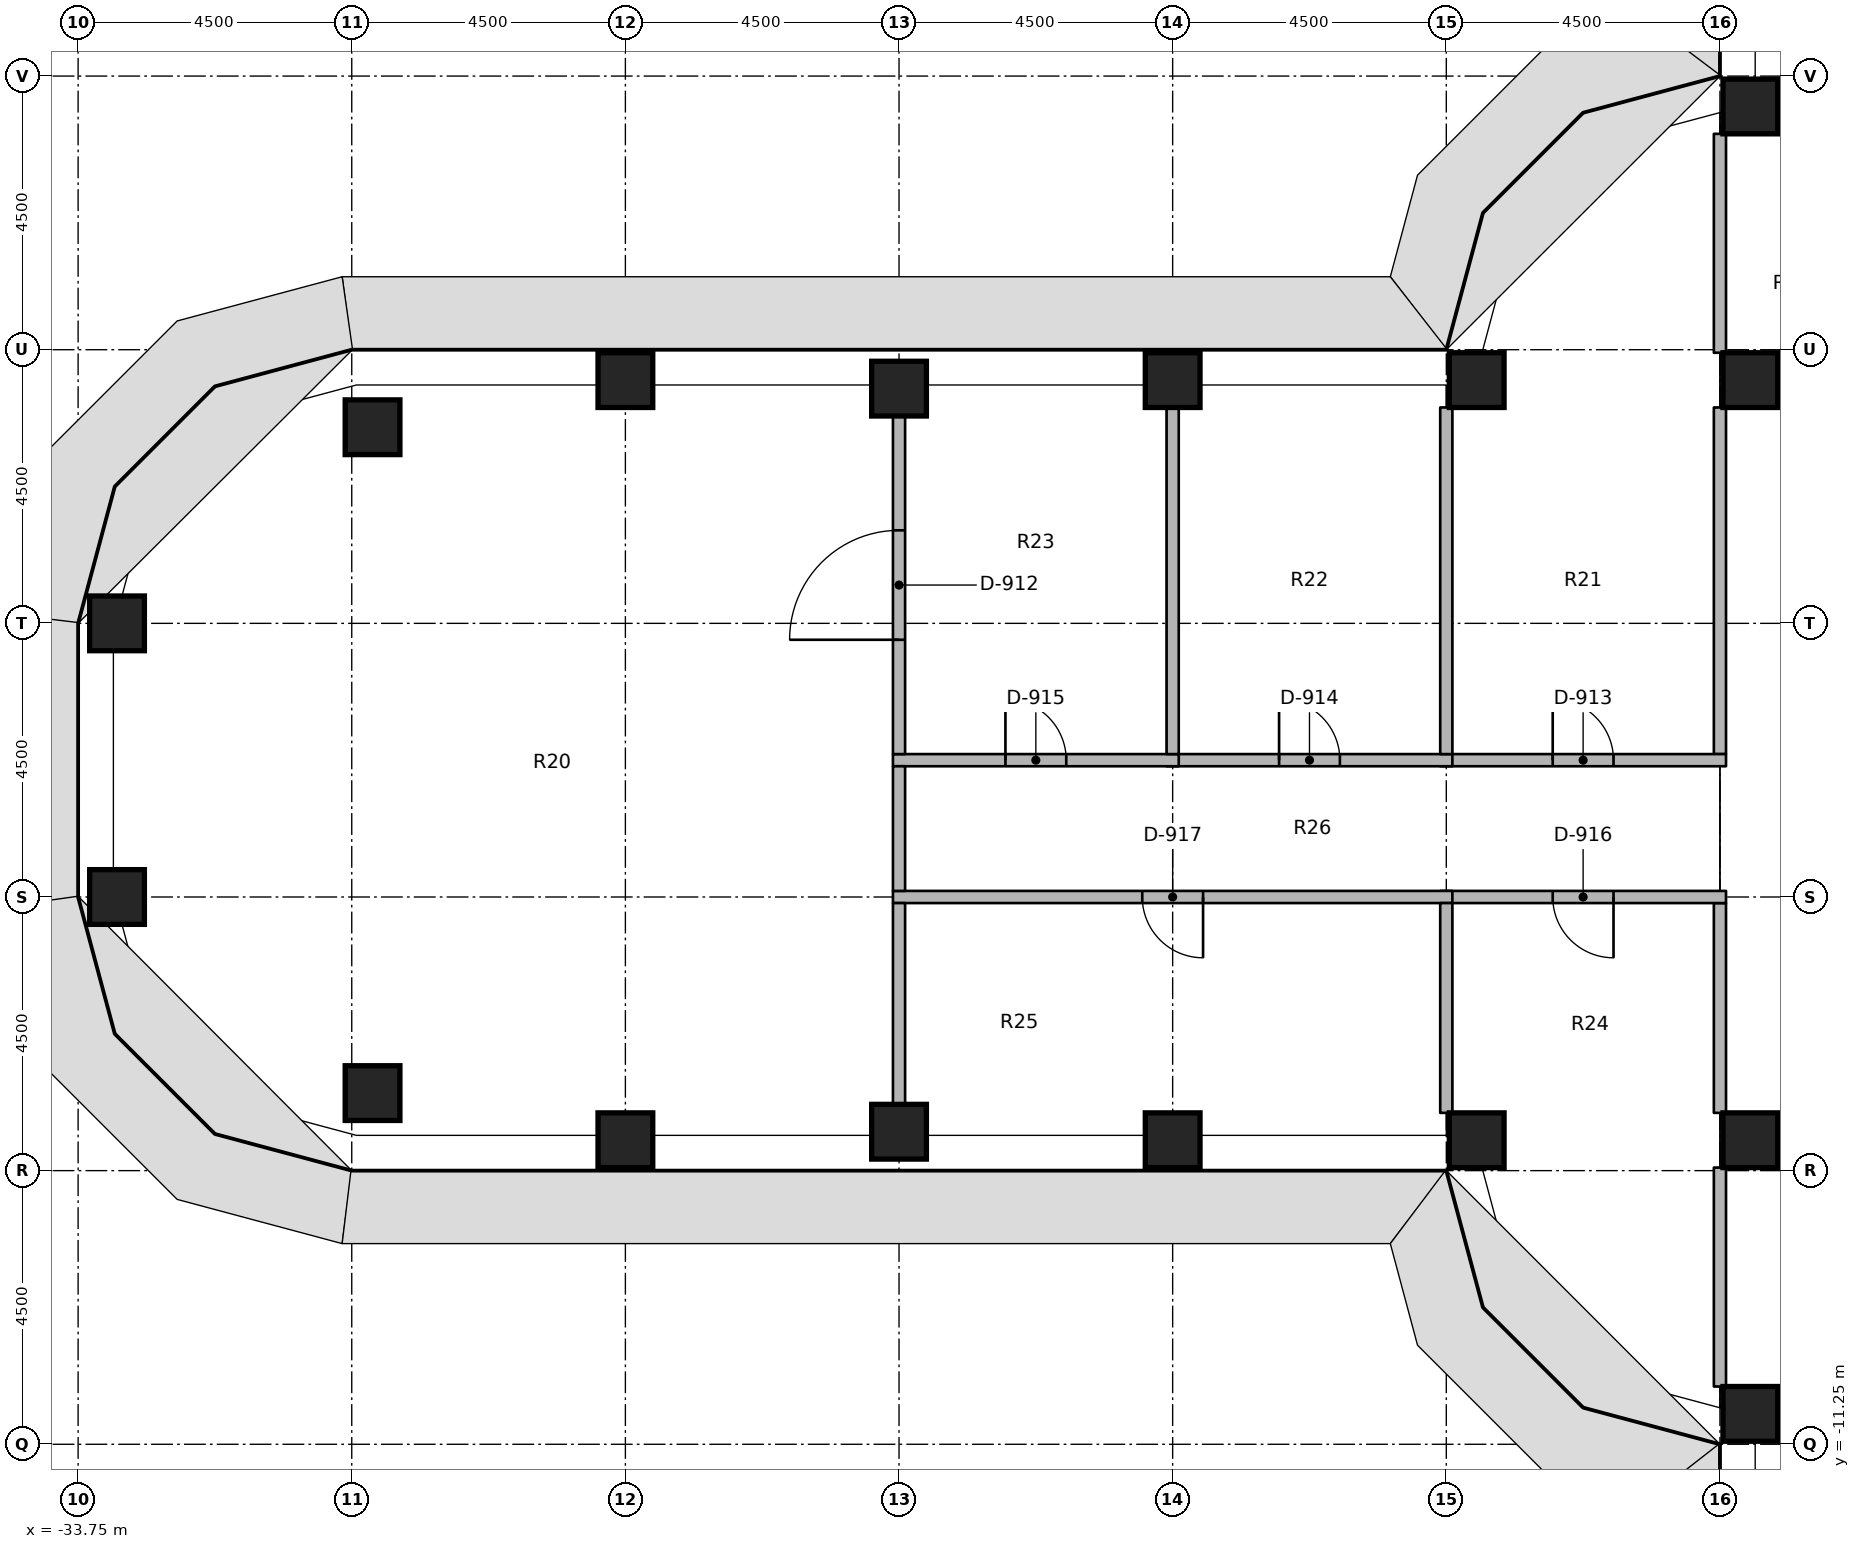
"""IFC4 building model, lengths in metres.
Left out: names, types, materials, properties, quantities, classifications, styles, units other than length and angle.
Written with IfcOpenShell. Run it as: python <this file> out.ifc"""

import sys

from ifc_helpers import new_model, si_unit, direction, frame, frame_2d, origin, origin_2d, place, context, subcontext, project, spatial, rectangle, extrude, element, fill, save


model = new_model("IFC4")
c1 = context("Model", 3, precision=1e-05, world=origin(), true_north=direction((0.0, 1.0)))
c2 = subcontext(c1, "Body", "Model", "MODEL_VIEW")
j1 = project(units=[si_unit("LENGTHUNIT", "METRE"), si_unit("PLANEANGLEUNIT", "RADIAN")], contexts=[c1])
p1 = place(None, origin())
s1 = spatial("IfcSite", under=j1, at=p1, CompositionType="ELEMENT")
p2 = place(p1, origin())
s2 = spatial("IfcBuilding", under=s1, at=p2, CompositionType="ELEMENT")
p3 = place(p2, frame((0.0, 0.0, 109.4)))
s3 = spatial("IfcBuildingStorey", under=s2, at=p3, CompositionType="ELEMENT", Elevation=109.4)
for number, where, z_axis, x_axis in (
    (1, (-33.11, -2.25, 0.0), (0.0, 0.0, 1.0), (1.0, 0.0, 0.0)),
    (2, (-33.11, 2.25, 0.0), (0.0, 0.0, 1.0), (1.0, 0.0, 0.0)),
    (3, (-28.908, -5.475, 0.0), (0.0, 0.0, 1.0), (1.0, 0.0, 0.0)),
    (4, (-28.908, 5.475, 0.0), (0.0, 0.0, 1.0), (1.0, 0.0, 0.0)),
    (5, (-24.75, -6.25, 0.0), (0.0, 0.0, 1.0), (1.0, 0.0, 0.0)),
    (6, (-24.75, 6.25, 0.0), (0.0, 0.0, 1.0), (1.0, 0.0, 0.0)),
    (7, (-20.25, -6.11, 0.0), (0.0, 0.0, 1.0), (1.0, 0.0, 0.0)),
    (8, (-20.25, 6.11, 0.0), (0.0, 0.0, 1.0), (1.0, 0.0, 0.0)),
    (9, (-15.75, -6.25, 0.0), (0.0, 0.0, 1.0), (1.0, 0.0, 0.0)),
    (10, (-15.75, 6.25, 0.0), (0.0, 0.0, 1.0), (1.0, 0.0, 0.0)),
    (11, (-10.75, -6.25, 0.0), (0.0, 0.0, 1.0), (1.0, 0.0, 0.0)),
    (12, (-10.75, 6.25, 0.0), (0.0, 0.0, 1.0), (1.0, 0.0, 0.0)),
    (13, (-6.25, -10.75, 0.0), (0.0, 0.0, 1.0), (1.0, 0.0, 0.0)),
    (14, (-6.25, -6.25, 0.0), (0.0, 0.0, 1.0), (1.0, 0.0, 0.0)),
    (15, (-6.25, 6.25, 0.0), (0.0, 0.0, 1.0), (1.0, 0.0, 0.0)),
    (16, (-6.25, 10.75, 0.0), (0.0, 0.0, 1.0), (1.0, 0.0, 0.0)),
):
    element("IfcColumn", number, at=place(p3, frame(where, z_axis=z_axis, x_axis=x_axis)), inside=s3, PredefinedType="COLUMN", context=c2, shape_type="SweptSolid", body=[
        extrude(rectangle(XDim=0.9, YDim=0.9, at=origin_2d()), origin(), (0.0, 0.0, 1.0), 3.65),
    ])
p4 = place(p3, frame((-6.75, 0.1, 0.0), z_axis=(0.0, 0.0, 1.0), x_axis=(0.0, 1.0, 0.0)))
e17 = element("IfcWall", 17, at=p4, inside=s3, PredefinedType="PARTITIONING", context=c2, shape_type="SweptSolid", body=[
    extrude(rectangle(XDim=5.7, YDim=0.2, at=frame_2d((2.85, 0.0))), origin(), (0.0, 0.0, 1.0), 2.738),
])
for number, where, z_axis, x_axis in (
    (18, (-6.75, 6.7, 0.0), (0.0, 0.0, 1.0), (0.0, 1.0, 0.0)),
    (19, (-6.75, -10.3, 0.0), (0.0, 0.0, 1.0), (0.0, 1.0, 0.0)),
):
    element("IfcWall", number, at=place(p3, frame(where, z_axis=z_axis, x_axis=x_axis)), inside=s3, PredefinedType="PARTITIONING", context=c2, shape_type="SweptSolid", body=[
        extrude(rectangle(XDim=3.6, YDim=0.2, at=frame_2d((1.8, 0.0))), origin(), (0.0, 0.0, 1.0), 2.738),
    ])
p5 = place(p3, frame((-6.75, -5.8, 0.0), z_axis=(0.0, 0.0, 1.0), x_axis=(0.0, 1.0, 0.0)))
e20 = element("IfcWall", 20, at=p5, inside=s3, PredefinedType="PARTITIONING", context=c2, shape_type="SweptSolid", body=[
    extrude(rectangle(XDim=3.45, YDim=0.2, at=frame_2d((1.725, 0.0))), origin(), (0.0, 0.0, 1.0), 2.738),
])
p6 = place(p3, frame((-11.35, 0.0, 0.0), z_axis=(0.0, 0.0, 1.0), x_axis=(1.0, 0.0, 0.0)))
e21 = element("IfcWall", 21, at=p6, inside=s3, PredefinedType="PARTITIONING", context=c2, shape_type="SweptSolid", body=[
    extrude(rectangle(XDim=4.7, YDim=0.2, at=frame_2d((2.35, 0.0))), origin(), (0.0, 0.0, 1.0), 2.738),
])
p7 = place(p6, frame((1.85, 0.0, 0.0)))
e22 = element("IfcOpeningElement", 22, at=p7, cuts=e21, PredefinedType="OPENING", context=c2, shape_type="SweptSolid", body=[
    extrude(rectangle(XDim=1.0, YDim=2.1, at=frame_2d((0.5, 1.05))), frame((0.0, 0.11, 0.0), z_axis=(0.0, -1.0, 0.0), x_axis=(1.0, 0.0, 0.0)), (0.0, 0.0, 1.0), 0.22),
])
p8 = place(p3, frame((-6.65, -2.25, 0.0), z_axis=(0.0, 0.0, 1.0), x_axis=(-1.0, 0.0, 0.0)))
e23 = element("IfcWall", 23, at=p8, inside=s3, PredefinedType="PARTITIONING", context=c2, shape_type="SweptSolid", body=[
    extrude(rectangle(XDim=4.7, YDim=0.2, at=frame_2d((2.35, 0.0))), origin(), (0.0, 0.0, 1.0), 2.738),
])
p9 = place(p8, frame((1.85, 0.0, 0.0)))
e24 = element("IfcOpeningElement", 24, at=p9, cuts=e23, PredefinedType="OPENING", context=c2, shape_type="SweptSolid", body=[
    extrude(rectangle(XDim=1.0, YDim=2.1, at=frame_2d((0.5, 1.05))), frame((0.0, 0.11, 0.0), z_axis=(0.0, -1.0, 0.0), x_axis=(1.0, 0.0, 0.0)), (0.0, 0.0, 1.0), 0.22),
])
p10 = place(p3, frame((-15.85, 0.0, 0.0), z_axis=(0.0, 0.0, 1.0), x_axis=(1.0, 0.0, 0.0)))
e25 = element("IfcWall", 25, at=p10, inside=s3, PredefinedType="PARTITIONING", context=c2, shape_type="SweptSolid", body=[
    extrude(rectangle(XDim=4.7, YDim=0.2, at=frame_2d((2.35, 0.0))), origin(), (0.0, 0.0, 1.0), 2.738),
])
p11 = place(p10, frame((1.85, 0.0, 0.0)))
e26 = element("IfcOpeningElement", 26, at=p11, cuts=e25, PredefinedType="OPENING", context=c2, shape_type="SweptSolid", body=[
    extrude(rectangle(XDim=1.0, YDim=2.1, at=frame_2d((0.5, 1.05))), frame((0.0, 0.11, 0.0), z_axis=(0.0, -1.0, 0.0), x_axis=(1.0, 0.0, 0.0)), (0.0, 0.0, 1.0), 0.22),
])
p12 = place(p3, frame((-20.35, 0.0, 0.0), z_axis=(0.0, 0.0, 1.0), x_axis=(1.0, 0.0, 0.0)))
e27 = element("IfcWall", 27, at=p12, inside=s3, PredefinedType="PARTITIONING", context=c2, shape_type="SweptSolid", body=[
    extrude(rectangle(XDim=4.7, YDim=0.2, at=frame_2d((2.35, 0.0))), origin(), (0.0, 0.0, 1.0), 2.738),
])
p13 = place(p12, frame((1.85, 0.0, 0.0)))
e28 = element("IfcOpeningElement", 28, at=p13, cuts=e27, PredefinedType="OPENING", context=c2, shape_type="SweptSolid", body=[
    extrude(rectangle(XDim=1.0, YDim=2.1, at=frame_2d((0.5, 1.05))), frame((0.0, 0.11, 0.0), z_axis=(0.0, -1.0, 0.0), x_axis=(1.0, 0.0, 0.0)), (0.0, 0.0, 1.0), 0.22),
])
p14 = place(p3, frame((-11.15, -2.25, 0.0), z_axis=(0.0, 0.0, 1.0), x_axis=(-1.0, 0.0, 0.0)))
e29 = element("IfcWall", 29, at=p14, inside=s3, PredefinedType="PARTITIONING", context=c2, shape_type="SweptSolid", body=[
    extrude(rectangle(XDim=9.2, YDim=0.2, at=frame_2d((4.6, 0.0))), origin(), (0.0, 0.0, 1.0), 2.738),
])
p15 = place(p14, frame((4.1, 0.0, 0.0)))
e30 = element("IfcOpeningElement", 30, at=p15, cuts=e29, PredefinedType="OPENING", context=c2, shape_type="SweptSolid", body=[
    extrude(rectangle(XDim=1.0, YDim=2.1, at=frame_2d((0.5, 1.05))), frame((0.0, 0.11, 0.0), z_axis=(0.0, -1.0, 0.0), x_axis=(1.0, 0.0, 0.0)), (0.0, 0.0, 1.0), 0.22),
])
p16 = place(p3, frame((-20.25, -2.15, 0.0), z_axis=(0.0, 0.0, 1.0), x_axis=(0.0, 1.0, 0.0)))
e31 = element("IfcWall", 31, at=p16, inside=s3, PredefinedType="PARTITIONING", context=c2, shape_type="SweptSolid", body=[
    extrude(rectangle(XDim=2.05, YDim=0.2, at=frame_2d((1.025, 0.0))), origin(), (0.0, 0.0, 1.0), 2.738),
])
p17 = place(p3, frame((-11.25, 0.1, 0.0), z_axis=(0.0, 0.0, 1.0), x_axis=(0.0, 1.0, 0.0)))
e32 = element("IfcWall", 32, at=p17, inside=s3, PredefinedType="PARTITIONING", context=c2, shape_type="SweptSolid", body=[
    extrude(rectangle(XDim=5.7, YDim=0.2, at=frame_2d((2.85, 0.0))), origin(), (0.0, 0.0, 1.0), 2.738),
])
p18 = place(p3, frame((-11.25, -5.8, 0.0), z_axis=(0.0, 0.0, 1.0), x_axis=(0.0, 1.0, 0.0)))
e33 = element("IfcWall", 33, at=p18, inside=s3, PredefinedType="PARTITIONING", context=c2, shape_type="SweptSolid", body=[
    extrude(rectangle(XDim=3.45, YDim=0.2, at=frame_2d((1.725, 0.0))), origin(), (0.0, 0.0, 1.0), 2.738),
])
p19 = place(p3, frame((-15.75, 0.1, 0.0), z_axis=(0.0, 0.0, 1.0), x_axis=(0.0, 1.0, 0.0)))
e34 = element("IfcWall", 34, at=p19, inside=s3, PredefinedType="PARTITIONING", context=c2, shape_type="SweptSolid", body=[
    extrude(rectangle(XDim=5.7, YDim=0.2, at=frame_2d((2.85, 0.0))), origin(), (0.0, 0.0, 1.0), 2.738),
])
p20 = place(p3, frame((-20.25, 0.1, 0.0), z_axis=(0.0, 0.0, 1.0), x_axis=(0.0, 1.0, 0.0)))
e35 = element("IfcWall", 35, at=p20, inside=s3, PredefinedType="PARTITIONING", context=c2, shape_type="SweptSolid", body=[
    extrude(rectangle(XDim=5.56, YDim=0.2, at=frame_2d((2.78, 0.0))), origin(), (0.0, 0.0, 1.0), 2.738),
])
p21 = place(p20, frame((1.88, 0.0, 0.0)))
e36 = element("IfcOpeningElement", 36, at=p21, cuts=e35, PredefinedType="OPENING", context=c2, shape_type="SweptSolid", body=[
    extrude(rectangle(XDim=1.8, YDim=2.1, at=frame_2d((0.9, 1.05))), frame((0.0, 0.11, 0.0), z_axis=(0.0, -1.0, 0.0), x_axis=(1.0, 0.0, 0.0)), (0.0, 0.0, 1.0), 0.22),
])
p22 = place(p3, frame((-20.25, -5.66, 0.0), z_axis=(0.0, 0.0, 1.0), x_axis=(0.0, 1.0, 0.0)))
e37 = element("IfcWall", 37, at=p22, inside=s3, PredefinedType="PARTITIONING", context=c2, shape_type="SweptSolid", body=[
    extrude(rectangle(XDim=3.31, YDim=0.2, at=frame_2d((1.655, 0.0))), origin(), (0.0, 0.0, 1.0), 2.738),
])
p23 = place(p21, origin())
e38 = element("IfcDoor", 38, at=p23, inside=s3, OperationType="DOUBLE_DOOR_SINGLE_SWING", PredefinedType="DOOR", context=c2, shape_type="SweptSolid", body=[
    extrude(rectangle(XDim=1.8, YDim=2.1, at=frame_2d((0.9, 1.05))), frame((0.0, 0.025, 0.0), z_axis=(0.0, -1.0, 0.0), x_axis=(1.0, 0.0, 0.0)), (0.0, 0.0, 1.0), 0.05),
])
fill(e36, e38)
p24 = place(p7, origin())
e39 = element("IfcDoor", 39, at=p24, inside=s3, OperationType="SINGLE_SWING_RIGHT", PredefinedType="DOOR", context=c2, shape_type="SweptSolid", body=[
    extrude(rectangle(XDim=1.0, YDim=2.1, at=frame_2d((0.5, 1.05))), frame((0.0, 0.025, 0.0), z_axis=(0.0, -1.0, 0.0), x_axis=(1.0, 0.0, 0.0)), (0.0, 0.0, 1.0), 0.05),
])
fill(e22, e39)
p25 = place(p11, origin())
e40 = element("IfcDoor", 40, at=p25, inside=s3, OperationType="SINGLE_SWING_RIGHT", PredefinedType="DOOR", context=c2, shape_type="SweptSolid", body=[
    extrude(rectangle(XDim=1.0, YDim=2.1, at=frame_2d((0.5, 1.05))), frame((0.0, 0.025, 0.0), z_axis=(0.0, -1.0, 0.0), x_axis=(1.0, 0.0, 0.0)), (0.0, 0.0, 1.0), 0.05),
])
fill(e26, e40)
p26 = place(p13, origin())
e41 = element("IfcDoor", 41, at=p26, inside=s3, OperationType="SINGLE_SWING_RIGHT", PredefinedType="DOOR", context=c2, shape_type="SweptSolid", body=[
    extrude(rectangle(XDim=1.0, YDim=2.1, at=frame_2d((0.5, 1.05))), frame((0.0, 0.025, 0.0), z_axis=(0.0, -1.0, 0.0), x_axis=(1.0, 0.0, 0.0)), (0.0, 0.0, 1.0), 0.05),
])
fill(e28, e41)
p27 = place(p9, origin())
e42 = element("IfcDoor", 42, at=p27, inside=s3, OperationType="SINGLE_SWING_RIGHT", PredefinedType="DOOR", context=c2, shape_type="SweptSolid", body=[
    extrude(rectangle(XDim=1.0, YDim=2.1, at=frame_2d((0.5, 1.05))), frame((0.0, 0.025, 0.0), z_axis=(0.0, -1.0, 0.0), x_axis=(1.0, 0.0, 0.0)), (0.0, 0.0, 1.0), 0.05),
])
fill(e24, e42)
p28 = place(p15, origin())
e43 = element("IfcDoor", 43, at=p28, inside=s3, OperationType="SINGLE_SWING_LEFT", PredefinedType="DOOR", context=c2, shape_type="SweptSolid", body=[
    extrude(rectangle(XDim=1.0, YDim=2.1, at=frame_2d((0.5, 1.05))), frame((0.0, 0.025, 0.0), z_axis=(0.0, -1.0, 0.0), x_axis=(1.0, 0.0, 0.0)), (0.0, 0.0, 1.0), 0.05),
])
fill(e30, e43)
save(model, sys.argv[1])
